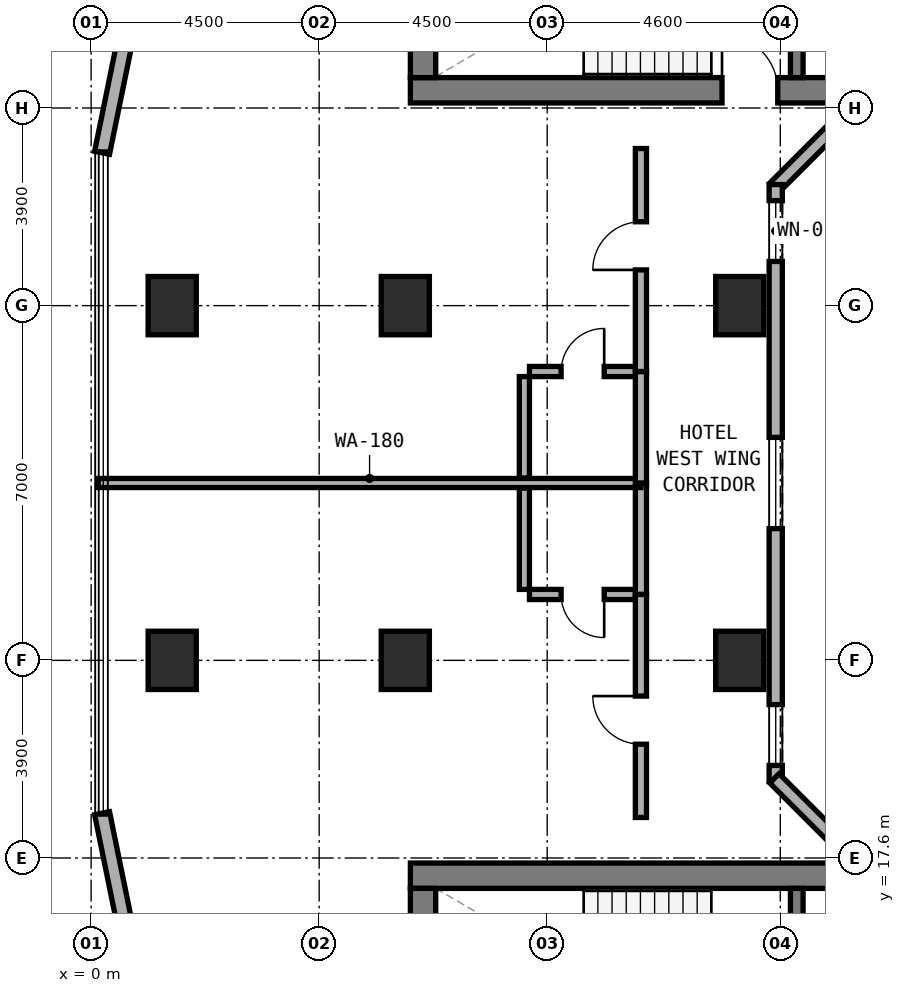
"""IFC4 building model, lengths in metres.
Left out: names, types, materials, properties, quantities, classifications, styles, units other than length and angle.
Written with IfcOpenShell. Run it as: python <this file> out.ifc"""

import sys

from ifc_helpers import new_model, si_unit, direction, frame, frame_2d, origin, origin_2d, place, context, subcontext, project, spatial, rectangle, extrude, element, fill, save


model = new_model("IFC4")
c1 = context("Model", 3, precision=1e-05, world=origin(), true_north=direction((0.0, 1.0)))
c2 = subcontext(c1, "Body", "Model", "MODEL_VIEW")
j1 = project(units=[si_unit("LENGTHUNIT", "METRE"), si_unit("PLANEANGLEUNIT", "RADIAN")], contexts=[c1])
p1 = place(None, origin())
s1 = spatial("IfcSite", under=j1, at=p1, CompositionType="ELEMENT")
p2 = place(p1, origin())
s2 = spatial("IfcBuilding", under=s1, at=p2, CompositionType="ELEMENT")
p3 = place(p2, frame((0.0, 0.0, 59.0)))
s3 = spatial("IfcBuildingStorey", under=s2, at=p3, CompositionType="ELEMENT", Elevation=59.0)
p4 = place(p3, frame((6.3, 32.75, 0.0), z_axis=(0.0, 0.0, 1.0), x_axis=(1.0, 0.0, 0.0)))
e1 = element("IfcWall", 1, at=p4, inside=s3, PredefinedType="SHEAR", context=c2, shape_type="SweptSolid", body=[
    extrude(rectangle(XDim=24.6, YDim=0.5, at=frame_2d((12.3, 0.0))), origin(), (0.0, 0.0, 1.0), 3.5),
])
p5 = place(p4, frame((6.15, 0.0, 0.0)))
e2 = element("IfcOpeningElement", 2, at=p5, cuts=e1, PredefinedType="OPENING", context=c2, shape_type="SweptSolid", body=[
    extrude(rectangle(XDim=1.1, YDim=2.15, at=frame_2d((0.55, 1.075))), frame((0.0, 0.26, 0.0), z_axis=(0.0, -1.0, 0.0), x_axis=(1.0, 0.0, 0.0)), (0.0, 0.0, 1.0), 0.52),
])
p6 = place(p3, frame((6.55, 33.0, 0.0), z_axis=(0.0, 0.0, 1.0), x_axis=(0.0, 1.0, 0.0)))
e3 = element("IfcWall", 3, at=p6, inside=s3, PredefinedType="SHEAR", context=c2, shape_type="SweptSolid", body=[
    extrude(rectangle(XDim=3.16, YDim=0.5, at=frame_2d((1.58, 0.0))), origin(), (0.0, 0.0, 1.0), 3.5),
])
p7 = place(p3, frame((13.925, 33.0, 0.0), z_axis=(0.0, 0.0, 1.0), x_axis=(0.0, 1.0, 0.0)))
e4 = element("IfcWall", 4, at=p7, inside=s3, PredefinedType="STANDARD", context=c2, shape_type="SweptSolid", body=[
    extrude(rectangle(XDim=3.16, YDim=0.25, at=frame_2d((1.58, 0.0))), origin(), (0.0, 0.0, 1.0), 3.22),
])
p8 = place(p7, frame((0.98, 0.0, 0.0)))
e5 = element("IfcOpeningElement", 5, at=p8, cuts=e4, PredefinedType="OPENING", context=c2, shape_type="SweptSolid", body=[
    extrude(rectangle(XDim=1.1, YDim=2.15, at=frame_2d((0.55, 1.075))), frame((0.0, 0.135, 0.0), z_axis=(0.0, -1.0, 0.0), x_axis=(1.0, 0.0, 0.0)), (0.0, 0.0, 1.0), 0.27),
])
p9 = place(p3, frame((6.3, 17.25, 0.0), z_axis=(0.0, 0.0, 1.0), x_axis=(1.0, 0.0, 0.0)))
e6 = element("IfcWall", 6, at=p9, inside=s3, PredefinedType="SHEAR", context=c2, shape_type="SweptSolid", body=[
    extrude(rectangle(XDim=24.6, YDim=0.5, at=frame_2d((12.3, 0.0))), origin(), (0.0, 0.0, 1.0), 3.5),
])
p10 = place(p3, frame((6.55, 13.84, 0.0), z_axis=(0.0, 0.0, 1.0), x_axis=(0.0, 1.0, 0.0)))
e7 = element("IfcWall", 7, at=p10, inside=s3, PredefinedType="SHEAR", context=c2, shape_type="SweptSolid", body=[
    extrude(rectangle(XDim=3.16, YDim=0.5, at=frame_2d((1.58, 0.0))), origin(), (0.0, 0.0, 1.0), 3.5),
])
p11 = place(p3, frame((13.925, 13.84, 0.0), z_axis=(0.0, 0.0, 1.0), x_axis=(0.0, 1.0, 0.0)))
e8 = element("IfcWall", 8, at=p11, inside=s3, PredefinedType="STANDARD", context=c2, shape_type="SweptSolid", body=[
    extrude(rectangle(XDim=3.16, YDim=0.25, at=frame_2d((1.58, 0.0))), origin(), (0.0, 0.0, 1.0), 3.22),
])
p12 = place(p11, frame((0.98, 0.0, 0.0)))
e9 = element("IfcOpeningElement", 9, at=p12, cuts=e8, PredefinedType="OPENING", context=c2, shape_type="SweptSolid", body=[
    extrude(rectangle(XDim=1.1, YDim=2.15, at=frame_2d((0.55, 1.075))), frame((0.0, 0.135, 0.0), z_axis=(0.0, -1.0, 0.0), x_axis=(1.0, 0.0, 0.0)), (0.0, 0.0, 1.0), 0.27),
])
for number, where, z_axis, x_axis in (
    (10, (6.2, 21.5, 0.0), (0.0, 0.0, 1.0), (1.0, 0.0, 0.0)),
    (11, (6.2, 28.5, 0.0), (0.0, 0.0, 1.0), (1.0, 0.0, 0.0)),
    (12, (12.8, 21.5, 0.0), (0.0, 0.0, 1.0), (1.0, 0.0, 0.0)),
    (13, (12.8, 28.5, 0.0), (0.0, 0.0, 1.0), (1.0, 0.0, 0.0)),
    (14, (1.6, 21.5, 0.0), (0.0, 0.0, 1.0), (1.0, 0.0, 0.0)),
    (15, (1.6, 28.5, 0.0), (0.0, 0.0, 1.0), (1.0, 0.0, 0.0)),
):
    element("IfcColumn", number, at=place(p3, frame(where, z_axis=z_axis, x_axis=x_axis)), inside=s3, PredefinedType="COLUMN", context=c2, shape_type="SweptSolid", body=[
        extrude(rectangle(XDim=0.95, YDim=1.15, at=origin_2d()), origin(), (0.0, 0.0, 1.0), 3.5),
    ])
p13 = place(p3, frame((2.229, 41.378, 0.0), z_axis=(0.0, 0.0, 1.0), x_axis=(-0.199990901713, -0.979797754249, 0.0)))
e16 = element("IfcWall", 16, at=p13, inside=s3, PredefinedType="STANDARD", context=c2, shape_type="SweptSolid", body=[
    extrude(rectangle(XDim=10.065, YDim=0.3, at=frame_2d((5.033, 0.0))), origin(), (0.0, 0.0, 1.0), 3.22),
])
p14 = place(p13, frame((0.378, 0.0, 0.85)))
e17 = element("IfcOpeningElement", 17, at=p14, cuts=e16, PredefinedType="OPENING", context=c2, shape_type="SweptSolid", body=[
    extrude(rectangle(XDim=1.8, YDim=1.5, at=frame_2d((0.9, 0.75))), frame((0.0, 0.16, 0.0), z_axis=(0.0, -1.0, 0.0), x_axis=(1.0, 0.0, 0.0)), (0.0, 0.0, 1.0), 0.32),
])
p15 = place(p13, frame((5.236, 0.0, 0.8)))
e18 = element("IfcOpeningElement", 18, at=p15, cuts=e16, PredefinedType="OPENING", context=c2, shape_type="SweptSolid", body=[
    extrude(rectangle(XDim=2.4, YDim=1.6, at=frame_2d((1.2, 0.8))), frame((0.0, 0.16, 0.0), z_axis=(0.0, -1.0, 0.0), x_axis=(1.0, 0.0, 0.0)), (0.0, 0.0, 1.0), 0.32),
])
p16 = place(p3, frame((0.216, 18.484, 0.0), z_axis=(0.0, 0.0, 1.0), x_axis=(0.199990901713, -0.979797754249, 0.0)))
e19 = element("IfcWall", 19, at=p16, inside=s3, PredefinedType="STANDARD", context=c2, shape_type="SweptSolid", body=[
    extrude(rectangle(XDim=10.065, YDim=0.3, at=frame_2d((5.033, 0.0))), origin(), (0.0, 0.0, 1.0), 3.22),
])
p17 = place(p16, frame((2.429, 0.0, 0.8)))
e20 = element("IfcOpeningElement", 20, at=p17, cuts=e19, PredefinedType="OPENING", context=c2, shape_type="SweptSolid", body=[
    extrude(rectangle(XDim=2.4, YDim=1.6, at=frame_2d((1.2, 0.8))), frame((0.0, 0.16, 0.0), z_axis=(0.0, -1.0, 0.0), x_axis=(1.0, 0.0, 0.0)), (0.0, 0.0, 1.0), 0.32),
])
p18 = place(p16, frame((7.887, 0.0, 0.85)))
e21 = element("IfcOpeningElement", 21, at=p18, cuts=e19, PredefinedType="OPENING", context=c2, shape_type="SweptSolid", body=[
    extrude(rectangle(XDim=1.8, YDim=1.5, at=frame_2d((0.9, 0.75))), frame((0.0, 0.16, 0.0), z_axis=(0.0, -1.0, 0.0), x_axis=(1.0, 0.0, 0.0)), (0.0, 0.0, 1.0), 0.32),
])
p19 = place(p3, frame((15.318, 32.662, 0.0), z_axis=(0.0, 0.0, 1.0), x_axis=(-0.707106781187, -0.707106781187, 0.0)))
e22 = element("IfcWall", 22, at=p19, inside=s3, PredefinedType="STANDARD", context=c2, shape_type="SweptSolid", body=[
    extrude(rectangle(XDim=2.594, YDim=0.26, at=frame_2d((1.297, 0.0))), origin(), (0.0, 0.0, 1.0), 3.22),
])
p20 = place(p3, frame((13.51, 30.89, 0.0), z_axis=(0.0, 0.0, 1.0), x_axis=(0.0, -1.0, 0.0)))
e23 = element("IfcWall", 23, at=p20, inside=s3, PredefinedType="STANDARD", context=c2, shape_type="SweptSolid", body=[
    extrude(rectangle(XDim=11.78, YDim=0.26, at=frame_2d((5.89, 0.0))), origin(), (0.0, 0.0, 1.0), 3.22),
])
p21 = place(p20, frame((0.318, 0.0, 0.85)))
e24 = element("IfcOpeningElement", 24, at=p21, cuts=e23, PredefinedType="OPENING", context=c2, shape_type="SweptSolid", body=[
    extrude(rectangle(XDim=1.2, YDim=1.5, at=frame_2d((0.6, 0.75))), frame((0.0, 0.14, 0.0), z_axis=(0.0, -1.0, 0.0), x_axis=(1.0, 0.0, 0.0)), (0.0, 0.0, 1.0), 0.28),
])
p22 = place(p20, frame((4.99, 0.0, 0.85)))
e25 = element("IfcOpeningElement", 25, at=p22, cuts=e23, PredefinedType="OPENING", context=c2, shape_type="SweptSolid", body=[
    extrude(rectangle(XDim=1.8, YDim=1.5, at=frame_2d((0.9, 0.75))), frame((0.0, 0.14, 0.0), z_axis=(0.0, -1.0, 0.0), x_axis=(1.0, 0.0, 0.0)), (0.0, 0.0, 1.0), 0.28),
])
p23 = place(p20, frame((10.263, 0.0, 0.85)))
e26 = element("IfcOpeningElement", 26, at=p23, cuts=e23, PredefinedType="OPENING", context=c2, shape_type="SweptSolid", body=[
    extrude(rectangle(XDim=1.2, YDim=1.5, at=frame_2d((0.6, 0.75))), frame((0.0, 0.14, 0.0), z_axis=(0.0, -1.0, 0.0), x_axis=(1.0, 0.0, 0.0)), (0.0, 0.0, 1.0), 0.28),
])
p24 = place(p3, frame((13.484, 19.172, 0.0), z_axis=(0.0, 0.0, 1.0), x_axis=(0.707106781187, -0.707106781187, 0.0)))
e27 = element("IfcWall", 27, at=p24, inside=s3, PredefinedType="STANDARD", context=c2, shape_type="SweptSolid", body=[
    extrude(rectangle(XDim=2.594, YDim=0.26, at=frame_2d((1.297, 0.0))), origin(), (0.0, 0.0, 1.0), 3.22),
])
p25 = place(p3, frame((8.65, 22.8, 0.0), z_axis=(0.0, 0.0, 1.0), x_axis=(1.0, 0.0, 0.0)))
e28 = element("IfcWall", 28, at=p25, inside=s3, PredefinedType="PLUMBINGWALL", context=c2, shape_type="SweptSolid", body=[
    extrude(rectangle(XDim=2.1, YDim=0.2, at=frame_2d((1.05, 0.0))), origin(), (0.0, 0.0, 1.0), 3.22),
])
p26 = place(p25, frame((0.625, 0.0, 0.0)))
e29 = element("IfcOpeningElement", 29, at=p26, cuts=e28, PredefinedType="OPENING", context=c2, shape_type="SweptSolid", body=[
    extrude(rectangle(XDim=0.85, YDim=2.1, at=frame_2d((0.425, 1.05))), frame((0.0, 0.11, 0.0), z_axis=(0.0, -1.0, 0.0), x_axis=(1.0, 0.0, 0.0)), (0.0, 0.0, 1.0), 0.22),
])
p27 = place(p3, frame((8.55, 22.9, 0.0), z_axis=(0.0, 0.0, 1.0), x_axis=(0.0, 1.0, 0.0)))
e30 = element("IfcWall", 30, at=p27, inside=s3, PredefinedType="PLUMBINGWALL", context=c2, shape_type="SweptSolid", body=[
    extrude(rectangle(XDim=2.0, YDim=0.2, at=frame_2d((1.0, 0.0))), origin(), (0.0, 0.0, 1.0), 3.22),
])
p28 = place(p3, frame((10.85, 22.8, 0.0), z_axis=(0.0, 0.0, 1.0), x_axis=(0.0, 1.0, 0.0)))
e31 = element("IfcWall", 31, at=p28, inside=s3, PredefinedType="SOLIDWALL", context=c2, shape_type="SweptSolid", body=[
    extrude(rectangle(XDim=2.2, YDim=0.22, at=frame_2d((1.1, 0.0))), origin(), (0.0, 0.0, 1.0), 3.22),
])
p29 = place(p3, frame((10.85, 18.4, 0.0), z_axis=(0.0, 0.0, 1.0), x_axis=(0.0, 1.0, 0.0)))
e32 = element("IfcWall", 32, at=p29, inside=s3, PredefinedType="SOLIDWALL", context=c2, shape_type="SweptSolid", body=[
    extrude(rectangle(XDim=4.4, YDim=0.22, at=frame_2d((2.2, 0.0))), origin(), (0.0, 0.0, 1.0), 2.495),
])
p30 = place(p29, frame((1.445, 0.0, 0.0)))
e33 = element("IfcOpeningElement", 33, at=p30, cuts=e32, PredefinedType="OPENING", context=c2, shape_type="SweptSolid", body=[
    extrude(rectangle(XDim=0.95, YDim=2.1, at=frame_2d((0.475, 1.05))), frame((0.0, 0.12, 0.0), z_axis=(0.0, -1.0, 0.0), x_axis=(1.0, 0.0, 0.0)), (0.0, 0.0, 1.0), 0.24),
])
p31 = place(p3, frame((0.14, 25.0, 0.0), z_axis=(0.0, 0.0, 1.0), x_axis=(1.0, 0.0, 0.0)))
e34 = element("IfcWall", 34, at=p31, inside=s3, PredefinedType="SOLIDWALL", context=c2, shape_type="SweptSolid", body=[
    extrude(rectangle(XDim=10.71, YDim=0.18, at=frame_2d((5.355, 0.0))), origin(), (0.0, 0.0, 1.0), 2.745),
])
p32 = place(p3, frame((8.65, 27.2, 0.0), z_axis=(0.0, 0.0, 1.0), x_axis=(1.0, 0.0, 0.0)))
e35 = element("IfcWall", 35, at=p32, inside=s3, PredefinedType="PLUMBINGWALL", context=c2, shape_type="SweptSolid", body=[
    extrude(rectangle(XDim=2.1, YDim=0.2, at=frame_2d((1.05, 0.0))), origin(), (0.0, 0.0, 1.0), 3.22),
])
p33 = place(p32, frame((0.625, 0.0, 0.0)))
e36 = element("IfcOpeningElement", 36, at=p33, cuts=e35, PredefinedType="OPENING", context=c2, shape_type="SweptSolid", body=[
    extrude(rectangle(XDim=0.85, YDim=2.1, at=frame_2d((0.425, 1.05))), frame((0.0, 0.11, 0.0), z_axis=(0.0, -1.0, 0.0), x_axis=(1.0, 0.0, 0.0)), (0.0, 0.0, 1.0), 0.22),
])
p34 = place(p3, frame((8.55, 25.1, 0.0), z_axis=(0.0, 0.0, 1.0), x_axis=(0.0, 1.0, 0.0)))
e37 = element("IfcWall", 37, at=p34, inside=s3, PredefinedType="PLUMBINGWALL", context=c2, shape_type="SweptSolid", body=[
    extrude(rectangle(XDim=2.0, YDim=0.2, at=frame_2d((1.0, 0.0))), origin(), (0.0, 0.0, 1.0), 3.22),
])
p35 = place(p3, frame((10.85, 25.0, 0.0), z_axis=(0.0, 0.0, 1.0), x_axis=(0.0, 1.0, 0.0)))
e38 = element("IfcWall", 38, at=p35, inside=s3, PredefinedType="SOLIDWALL", context=c2, shape_type="SweptSolid", body=[
    extrude(rectangle(XDim=2.2, YDim=0.22, at=frame_2d((1.1, 0.0))), origin(), (0.0, 0.0, 1.0), 3.22),
])
p36 = place(p3, frame((10.85, 27.2, 0.0), z_axis=(0.0, 0.0, 1.0), x_axis=(0.0, 1.0, 0.0)))
e39 = element("IfcWall", 39, at=p36, inside=s3, PredefinedType="SOLIDWALL", context=c2, shape_type="SweptSolid", body=[
    extrude(rectangle(XDim=4.4, YDim=0.22, at=frame_2d((2.2, 0.0))), origin(), (0.0, 0.0, 1.0), 2.495),
])
p37 = place(p36, frame((2.005, 0.0, 0.0)))
e40 = element("IfcOpeningElement", 40, at=p37, cuts=e39, PredefinedType="OPENING", context=c2, shape_type="SweptSolid", body=[
    extrude(rectangle(XDim=0.95, YDim=2.1, at=frame_2d((0.475, 1.05))), frame((0.0, 0.12, 0.0), z_axis=(0.0, -1.0, 0.0), x_axis=(1.0, 0.0, 0.0)), (0.0, 0.0, 1.0), 0.24),
])
p38 = place(p21, origin())
e41 = element("IfcWindow", 41, at=p38, inside=s3, PartitioningType="SINGLE_PANEL", PredefinedType="WINDOW", context=c2, shape_type="SweptSolid", body=[
    extrude(rectangle(XDim=1.2, YDim=1.5, at=frame_2d((0.6, 0.75))), frame((0.0, 0.03, 0.0), z_axis=(0.0, -1.0, 0.0), x_axis=(1.0, 0.0, 0.0)), (0.0, 0.0, 1.0), 0.06),
])
fill(e24, e41)
p39 = place(p22, origin())
e42 = element("IfcWindow", 42, at=p39, inside=s3, PartitioningType="SINGLE_PANEL", PredefinedType="WINDOW", context=c2, shape_type="SweptSolid", body=[
    extrude(rectangle(XDim=1.8, YDim=1.5, at=frame_2d((0.9, 0.75))), frame((0.0, 0.03, 0.0), z_axis=(0.0, -1.0, 0.0), x_axis=(1.0, 0.0, 0.0)), (0.0, 0.0, 1.0), 0.06),
])
fill(e25, e42)
p40 = place(p23, origin())
e43 = element("IfcWindow", 43, at=p40, inside=s3, PartitioningType="SINGLE_PANEL", PredefinedType="WINDOW", context=c2, shape_type="SweptSolid", body=[
    extrude(rectangle(XDim=1.2, YDim=1.5, at=frame_2d((0.6, 0.75))), frame((0.0, 0.03, 0.0), z_axis=(0.0, -1.0, 0.0), x_axis=(1.0, 0.0, 0.0)), (0.0, 0.0, 1.0), 0.06),
])
fill(e26, e43)
p41 = place(p5, origin())
e44 = element("IfcDoor", 44, at=p41, inside=s3, OperationType="SINGLE_SWING_LEFT", PredefinedType="DOOR", context=c2, shape_type="SweptSolid", body=[
    extrude(rectangle(XDim=1.1, YDim=2.15, at=frame_2d((0.55, 1.075))), frame((0.0, 0.025, 0.0), z_axis=(0.0, -1.0, 0.0), x_axis=(1.0, 0.0, 0.0)), (0.0, 0.0, 1.0), 0.05),
])
fill(e2, e44)
p42 = place(p26, frame((0.85, 0.0, 0.0), z_axis=(0.0, 0.0, 1.0), x_axis=(-1.0, 0.0, 0.0)))
e45 = element("IfcDoor", 45, at=p42, inside=s3, OperationType="SINGLE_SWING_LEFT", PredefinedType="DOOR", context=c2, shape_type="SweptSolid", body=[
    extrude(rectangle(XDim=0.85, YDim=2.1, at=frame_2d((0.425, 1.05))), frame((0.0, 0.025, 0.0), z_axis=(0.0, -1.0, 0.0), x_axis=(1.0, 0.0, 0.0)), (0.0, 0.0, 1.0), 0.05),
])
fill(e29, e45)
p43 = place(p30, origin())
e46 = element("IfcDoor", 46, at=p43, inside=s3, OperationType="SINGLE_SWING_RIGHT", PredefinedType="DOOR", context=c2, shape_type="SweptSolid", body=[
    extrude(rectangle(XDim=0.95, YDim=2.1, at=frame_2d((0.475, 1.05))), frame((0.0, 0.025, 0.0), z_axis=(0.0, -1.0, 0.0), x_axis=(1.0, 0.0, 0.0)), (0.0, 0.0, 1.0), 0.05),
])
fill(e33, e46)
p44 = place(p33, origin())
e47 = element("IfcDoor", 47, at=p44, inside=s3, OperationType="SINGLE_SWING_RIGHT", PredefinedType="DOOR", context=c2, shape_type="SweptSolid", body=[
    extrude(rectangle(XDim=0.85, YDim=2.1, at=frame_2d((0.425, 1.05))), frame((0.0, 0.025, 0.0), z_axis=(0.0, -1.0, 0.0), x_axis=(1.0, 0.0, 0.0)), (0.0, 0.0, 1.0), 0.05),
])
fill(e36, e47)
p45 = place(p37, origin())
e48 = element("IfcDoor", 48, at=p45, inside=s3, OperationType="SINGLE_SWING_LEFT", PredefinedType="DOOR", context=c2, shape_type="SweptSolid", body=[
    extrude(rectangle(XDim=0.95, YDim=2.1, at=frame_2d((0.475, 1.05))), frame((0.0, 0.025, 0.0), z_axis=(0.0, -1.0, 0.0), x_axis=(1.0, 0.0, 0.0)), (0.0, 0.0, 1.0), 0.05),
])
fill(e40, e48)
save(model, sys.argv[1])
